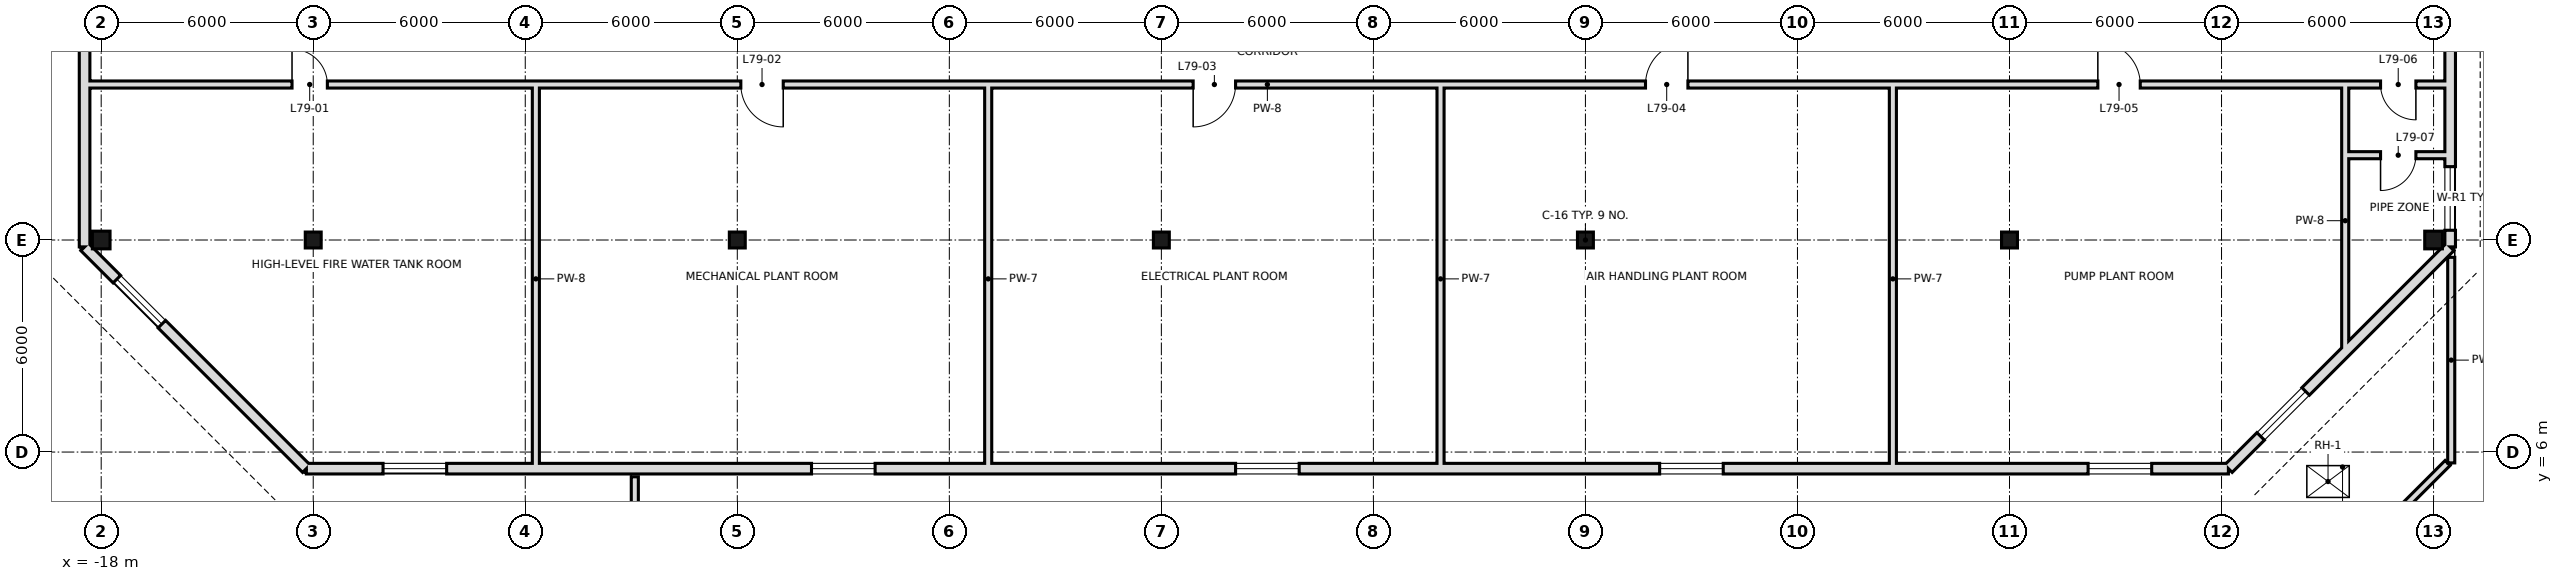
"""IFC4 building model, lengths in metres.
Left out: names, types, materials, properties, quantities, classifications, styles, units other than length and angle.
Written with IfcOpenShell. Run it as: python <this file> out.ifc"""

import sys

from ifc_helpers import new_model, si_unit, direction, frame, frame_2d, origin, origin_2d, place, context, subcontext, project, spatial, rectangle, hollow_rectangle, extrude, element, fill, save


model = new_model("IFC4")
c1 = context("Model", 3, precision=1e-05, world=origin(), true_north=direction((0.0, 1.0)))
c2 = subcontext(c1, "Body", "Model", "MODEL_VIEW")
j1 = project(units=[si_unit("LENGTHUNIT", "METRE"), si_unit("PLANEANGLEUNIT", "RADIAN")], contexts=[c1])
p1 = place(None, origin())
s1 = spatial("IfcSite", under=j1, at=p1, CompositionType="ELEMENT")
p2 = place(p1, origin())
s2 = spatial("IfcBuilding", under=s1, at=p2, CompositionType="ELEMENT")
p3 = place(p2, frame((0.0, 0.0, 331.2)))
s3 = spatial("IfcBuildingStorey", under=s2, at=p3, CompositionType="ELEMENT", Elevation=331.2)
p4 = place(p3, frame((-18.0, 12.0, 0.0), z_axis=(0.0, 0.0, 1.0), x_axis=(1.0, 0.0, 0.0)))
e1 = element("IfcColumn", 1, at=p4, inside=s3, PredefinedType="COLUMN", context=c2, shape_type="SweptSolid", body=[
    extrude(hollow_rectangle(XDim=0.5, YDim=0.5, WallThickness=0.025, at=origin_2d()), origin(), (0.0, 0.0, 1.0), 6.6),
])
for number, where, z_axis, x_axis in (
    (2, (-12.0, 12.0, 0.0), (0.0, 0.0, 1.0), (1.0, 0.0, 0.0)),
    (3, (0.0, 12.0, 0.0), (0.0, 0.0, 1.0), (1.0, 0.0, 0.0)),
    (4, (12.0, 12.0, 0.0), (0.0, 0.0, 1.0), (1.0, 0.0, 0.0)),
    (5, (24.0, 12.0, 0.0), (0.0, 0.0, 1.0), (1.0, 0.0, 0.0)),
    (6, (36.0, 12.0, 0.0), (0.0, 0.0, 1.0), (1.0, 0.0, 0.0)),
):
    element("IfcColumn", number, at=place(p3, frame(where, z_axis=z_axis, x_axis=x_axis)), inside=s3, PredefinedType="COLUMN", context=c2, shape_type="SweptSolid", body=[
        extrude(hollow_rectangle(XDim=0.45, YDim=0.45, WallThickness=0.022, at=origin_2d()), origin(), (0.0, 0.0, 1.0), 6.6),
    ])
p5 = place(p3, frame((48.0, 12.0, 0.0), z_axis=(0.0, 0.0, 1.0), x_axis=(1.0, 0.0, 0.0)))
e7 = element("IfcColumn", 7, at=p5, inside=s3, PredefinedType="COLUMN", context=c2, shape_type="SweptSolid", body=[
    extrude(hollow_rectangle(XDim=0.5, YDim=0.5, WallThickness=0.025, at=origin_2d()), origin(), (0.0, 0.0, 1.0), 6.6),
])
p6 = place(p3, frame((-12.195, 5.53, 0.0), z_axis=(0.0, 0.0, 1.0), x_axis=(1.0, 0.0, 0.0)))
e8 = element("IfcWall", 8, at=p6, inside=s3, PredefinedType="SOLIDWALL", context=c2, shape_type="SweptSolid", body=[
    extrude(rectangle(XDim=54.389, YDim=0.3, at=frame_2d((27.195, 0.0))), origin(), (0.0, 0.0, 1.0), 6.35),
])
p7 = place(p6, frame((2.17, 0.0, 0.9)))
e9 = element("IfcOpeningElement", 9, at=p7, cuts=e8, PredefinedType="OPENING", context=c2, shape_type="SweptSolid", body=[
    extrude(rectangle(XDim=1.8, YDim=1.5, at=frame_2d((0.9, 0.75))), frame((0.0, 0.16, 0.0), z_axis=(0.0, -1.0, 0.0), x_axis=(1.0, 0.0, 0.0)), (0.0, 0.0, 1.0), 0.32),
])
p8 = place(p6, frame((14.295, 0.0, 0.9)))
e10 = element("IfcOpeningElement", 10, at=p8, cuts=e8, PredefinedType="OPENING", context=c2, shape_type="SweptSolid", body=[
    extrude(rectangle(XDim=1.8, YDim=1.5, at=frame_2d((0.9, 0.75))), frame((0.0, 0.16, 0.0), z_axis=(0.0, -1.0, 0.0), x_axis=(1.0, 0.0, 0.0)), (0.0, 0.0, 1.0), 0.32),
])
p9 = place(p6, frame((26.295, 0.0, 0.9)))
e11 = element("IfcOpeningElement", 11, at=p9, cuts=e8, PredefinedType="OPENING", context=c2, shape_type="SweptSolid", body=[
    extrude(rectangle(XDim=1.8, YDim=1.5, at=frame_2d((0.9, 0.75))), frame((0.0, 0.16, 0.0), z_axis=(0.0, -1.0, 0.0), x_axis=(1.0, 0.0, 0.0)), (0.0, 0.0, 1.0), 0.32),
])
p10 = place(p6, frame((38.295, 0.0, 0.9)))
e12 = element("IfcOpeningElement", 12, at=p10, cuts=e8, PredefinedType="OPENING", context=c2, shape_type="SweptSolid", body=[
    extrude(rectangle(XDim=1.8, YDim=1.5, at=frame_2d((0.9, 0.75))), frame((0.0, 0.16, 0.0), z_axis=(0.0, -1.0, 0.0), x_axis=(1.0, 0.0, 0.0)), (0.0, 0.0, 1.0), 0.32),
])
p11 = place(p6, frame((50.419, 0.0, 0.9)))
e13 = element("IfcOpeningElement", 13, at=p11, cuts=e8, PredefinedType="OPENING", context=c2, shape_type="SweptSolid", body=[
    extrude(rectangle(XDim=1.8, YDim=1.5, at=frame_2d((0.9, 0.75))), frame((0.0, 0.16, 0.0), z_axis=(0.0, -1.0, 0.0), x_axis=(1.0, 0.0, 0.0)), (0.0, 0.0, 1.0), 0.32),
])
p12 = place(p3, frame((42.195, 5.53, 0.0), z_axis=(0.0, 0.0, 1.0), x_axis=(0.707106781187, 0.707106781187, 0.0)))
e14 = element("IfcWall", 14, at=p12, inside=s3, PredefinedType="SOLIDWALL", context=c2, shape_type="SweptSolid", body=[
    extrude(rectangle(XDim=8.875, YDim=0.3, at=frame_2d((4.438, 0.0))), origin(), (0.0, 0.0, 1.0), 6.35),
])
p13 = place(p12, frame((1.292, 0.0, 0.9)))
e15 = element("IfcOpeningElement", 15, at=p13, cuts=e14, PredefinedType="OPENING", context=c2, shape_type="SweptSolid", body=[
    extrude(rectangle(XDim=1.8, YDim=1.5, at=frame_2d((0.9, 0.75))), frame((0.0, 0.16, 0.0), z_axis=(0.0, -1.0, 0.0), x_axis=(1.0, 0.0, 0.0)), (0.0, 0.0, 1.0), 0.32),
])
p14 = place(p3, frame((48.47, 11.805, 0.0), z_axis=(0.0, 0.0, 1.0), x_axis=(0.0, 1.0, 0.0)))
e16 = element("IfcWall", 16, at=p14, inside=s3, PredefinedType="SOLIDWALL", context=c2, shape_type="SweptSolid", body=[
    extrude(rectangle(XDim=36.665, YDim=0.3, at=frame_2d((18.332, 0.0))), origin(), (0.0, 0.0, 1.0), 6.35),
])
p15 = place(p14, frame((0.47, 0.0, 0.9)))
e17 = element("IfcOpeningElement", 17, at=p15, cuts=e16, PredefinedType="OPENING", context=c2, shape_type="SweptSolid", body=[
    extrude(rectangle(XDim=1.8, YDim=1.5, at=frame_2d((0.9, 0.75))), frame((0.0, 0.16, 0.0), z_axis=(0.0, -1.0, 0.0), x_axis=(1.0, 0.0, 0.0)), (0.0, 0.0, 1.0), 0.32),
])
p16 = place(p14, frame((14.295, 0.0, 0.9)))
e18 = element("IfcOpeningElement", 18, at=p16, cuts=e16, PredefinedType="OPENING", context=c2, shape_type="SweptSolid", body=[
    extrude(rectangle(XDim=1.8, YDim=1.5, at=frame_2d((0.9, 0.75))), frame((0.0, 0.16, 0.0), z_axis=(0.0, -1.0, 0.0), x_axis=(1.0, 0.0, 0.0)), (0.0, 0.0, 1.0), 0.32),
])
p17 = place(p14, frame((26.295, 0.0, 0.9)))
e19 = element("IfcOpeningElement", 19, at=p17, cuts=e16, PredefinedType="OPENING", context=c2, shape_type="SweptSolid", body=[
    extrude(rectangle(XDim=1.8, YDim=1.5, at=frame_2d((0.9, 0.75))), frame((0.0, 0.16, 0.0), z_axis=(0.0, -1.0, 0.0), x_axis=(1.0, 0.0, 0.0)), (0.0, 0.0, 1.0), 0.32),
])
p18 = place(p3, frame((-18.47, 48.47, 0.0), z_axis=(0.0, 0.0, 1.0), x_axis=(0.0, -1.0, 0.0)))
e20 = element("IfcWall", 20, at=p18, inside=s3, PredefinedType="SOLIDWALL", context=c2, shape_type="SweptSolid", body=[
    extrude(rectangle(XDim=36.665, YDim=0.3, at=frame_2d((18.332, 0.0))), origin(), (0.0, 0.0, 1.0), 6.35),
])
p19 = place(p18, frame((2.27, 0.0, 0.9)))
e21 = element("IfcOpeningElement", 21, at=p19, cuts=e20, PredefinedType="OPENING", context=c2, shape_type="SweptSolid", body=[
    extrude(rectangle(XDim=1.8, YDim=1.5, at=frame_2d((0.9, 0.75))), frame((0.0, 0.16, 0.0), z_axis=(0.0, -1.0, 0.0), x_axis=(1.0, 0.0, 0.0)), (0.0, 0.0, 1.0), 0.32),
])
p20 = place(p18, frame((14.57, 0.0, 0.9)))
e22 = element("IfcOpeningElement", 22, at=p20, cuts=e20, PredefinedType="OPENING", context=c2, shape_type="SweptSolid", body=[
    extrude(rectangle(XDim=1.8, YDim=1.5, at=frame_2d((0.9, 0.75))), frame((0.0, 0.16, 0.0), z_axis=(0.0, -1.0, 0.0), x_axis=(1.0, 0.0, 0.0)), (0.0, 0.0, 1.0), 0.32),
])
p21 = place(p18, frame((26.57, 0.0, 0.9)))
e23 = element("IfcOpeningElement", 23, at=p21, cuts=e20, PredefinedType="OPENING", context=c2, shape_type="SweptSolid", body=[
    extrude(rectangle(XDim=1.8, YDim=1.5, at=frame_2d((0.9, 0.75))), frame((0.0, 0.16, 0.0), z_axis=(0.0, -1.0, 0.0), x_axis=(1.0, 0.0, 0.0)), (0.0, 0.0, 1.0), 0.32),
])
p22 = place(p3, frame((-18.47, 11.805, 0.0), z_axis=(0.0, 0.0, 1.0), x_axis=(0.707106781187, -0.707106781187, 0.0)))
e24 = element("IfcWall", 24, at=p22, inside=s3, PredefinedType="SOLIDWALL", context=c2, shape_type="SweptSolid", body=[
    extrude(rectangle(XDim=8.875, YDim=0.3, at=frame_2d((4.438, 0.0))), origin(), (0.0, 0.0, 1.0), 6.35),
])
p23 = place(p22, frame((1.292, 0.0, 0.9)))
e25 = element("IfcOpeningElement", 25, at=p23, cuts=e24, PredefinedType="OPENING", context=c2, shape_type="SweptSolid", body=[
    extrude(rectangle(XDim=1.8, YDim=1.5, at=frame_2d((0.9, 0.75))), frame((0.0, 0.16, 0.0), z_axis=(0.0, -1.0, 0.0), x_axis=(1.0, 0.0, 0.0)), (0.0, 0.0, 1.0), 0.32),
])
p24 = place(p3, frame((48.5, 11.51, 0.0), z_axis=(0.0, 0.0, 1.0), x_axis=(0.0, -1.0, 0.0)))
e26 = element("IfcWall", 26, at=p24, inside=s3, PredefinedType="PARAPET", context=c2, shape_type="SweptSolid", body=[
    extrude(rectangle(XDim=5.817, YDim=0.2, at=frame_2d((2.909, 0.0))), origin(), (0.0, 0.0, 1.0), 1.1),
])
p25 = place(p3, frame((48.397, 5.69, 0.0), z_axis=(0.0, 0.0, 1.0), x_axis=(-0.707106781187, -0.707106781187, 0.0)))
e27 = element("IfcWall", 27, at=p25, inside=s3, PredefinedType="PARAPET", context=c2, shape_type="SweptSolid", body=[
    extrude(rectangle(XDim=8.61, YDim=0.2, at=frame_2d((4.305, 0.0))), origin(), (0.0, 0.0, 1.0), 1.1),
])
p26 = place(p3, frame((-2.9, -0.4, 0.0), z_axis=(0.0, 0.0, 1.0), x_axis=(0.0, 1.0, 0.0)))
e28 = element("IfcWall", 28, at=p26, inside=s3, PredefinedType="PARAPET", context=c2, shape_type="SweptSolid", body=[
    extrude(rectangle(XDim=5.7, YDim=0.2, at=frame_2d((2.85, 0.0))), origin(), (0.0, 0.0, 1.0), 1.1),
])
for number, where, z_axis, x_axis in (
    (29, (-5.7, 5.5, 0.0), (0.0, 0.0, 1.0), (0.0, 1.0, 0.0)),
    (30, (7.1, 5.5, 0.0), (0.0, 0.0, 1.0), (0.0, 1.0, 0.0)),
    (31, (19.9, 5.5, 0.0), (0.0, 0.0, 1.0), (0.0, 1.0, 0.0)),
    (32, (32.7, 5.5, 0.0), (0.0, 0.0, 1.0), (0.0, 1.0, 0.0)),
):
    element("IfcWall", number, at=place(p3, frame(where, z_axis=z_axis, x_axis=x_axis)), inside=s3, PredefinedType="SOLIDWALL", context=c2, shape_type="SweptSolid", body=[
        extrude(rectangle(XDim=10.8, YDim=0.2, at=frame_2d((5.4, 0.0))), origin(), (0.0, 0.0, 1.0), 5.65),
    ])
p27 = place(p3, frame((45.5, 8.793, 0.0), z_axis=(0.0, 0.0, 1.0), x_axis=(0.0, 1.0, 0.0)))
e33 = element("IfcWall", 33, at=p27, inside=s3, PredefinedType="SOLIDWALL", context=c2, shape_type="SweptSolid", body=[
    extrude(rectangle(XDim=7.507, YDim=0.2, at=frame_2d((3.753, 0.0))), origin(), (0.0, 0.0, 1.0), 5.65),
])
p28 = place(p3, frame((45.6, 14.4, 0.0), z_axis=(0.0, 0.0, 1.0), x_axis=(1.0, 0.0, 0.0)))
e34 = element("IfcWall", 34, at=p28, inside=s3, PredefinedType="SOLIDWALL", context=c2, shape_type="SweptSolid", body=[
    extrude(rectangle(XDim=2.9, YDim=0.2, at=frame_2d((1.45, 0.0))), origin(), (0.0, 0.0, 1.0), 6.35),
])
p29 = place(p28, frame((0.9, 0.0, 0.0)))
e35 = element("IfcOpeningElement", 35, at=p29, cuts=e34, PredefinedType="OPENING", context=c2, shape_type="SweptSolid", body=[
    extrude(rectangle(XDim=1.0, YDim=2.4, at=frame_2d((0.5, 1.2))), frame((0.0, 0.11, 0.0), z_axis=(0.0, -1.0, 0.0), x_axis=(1.0, 0.0, 0.0)), (0.0, 0.0, 1.0), 0.22),
])
p30 = place(p3, frame((-18.5, 16.4, 0.0), z_axis=(0.0, 0.0, 1.0), x_axis=(1.0, 0.0, 0.0)))
e36 = element("IfcWall", 36, at=p30, inside=s3, PredefinedType="SOLIDWALL", context=c2, shape_type="SweptSolid", body=[
    extrude(rectangle(XDim=67.0, YDim=0.2, at=frame_2d((33.5, 0.0))), origin(), (0.0, 0.0, 1.0), 5.65),
])
p31 = place(p30, frame((5.9, 0.0, 0.0)))
e37 = element("IfcOpeningElement", 37, at=p31, cuts=e36, PredefinedType="OPENING", context=c2, shape_type="SweptSolid", body=[
    extrude(rectangle(XDim=1.0, YDim=2.4, at=frame_2d((0.5, 1.2))), frame((0.0, 0.11, 0.0), z_axis=(0.0, -1.0, 0.0), x_axis=(1.0, 0.0, 0.0)), (0.0, 0.0, 1.0), 0.22),
])
p32 = place(p30, frame((18.6, 0.0, 0.0)))
e38 = element("IfcOpeningElement", 38, at=p32, cuts=e36, PredefinedType="OPENING", context=c2, shape_type="SweptSolid", body=[
    extrude(rectangle(XDim=1.2, YDim=2.4, at=frame_2d((0.6, 1.2))), frame((0.0, 0.11, 0.0), z_axis=(0.0, -1.0, 0.0), x_axis=(1.0, 0.0, 0.0)), (0.0, 0.0, 1.0), 0.22),
])
p33 = place(p30, frame((31.4, 0.0, 0.0)))
e39 = element("IfcOpeningElement", 39, at=p33, cuts=e36, PredefinedType="OPENING", context=c2, shape_type="SweptSolid", body=[
    extrude(rectangle(XDim=1.2, YDim=2.4, at=frame_2d((0.6, 1.2))), frame((0.0, 0.11, 0.0), z_axis=(0.0, -1.0, 0.0), x_axis=(1.0, 0.0, 0.0)), (0.0, 0.0, 1.0), 0.22),
])
p34 = place(p30, frame((44.2, 0.0, 0.0)))
e40 = element("IfcOpeningElement", 40, at=p34, cuts=e36, PredefinedType="OPENING", context=c2, shape_type="SweptSolid", body=[
    extrude(rectangle(XDim=1.2, YDim=2.4, at=frame_2d((0.6, 1.2))), frame((0.0, 0.11, 0.0), z_axis=(0.0, -1.0, 0.0), x_axis=(1.0, 0.0, 0.0)), (0.0, 0.0, 1.0), 0.22),
])
p35 = place(p30, frame((57.0, 0.0, 0.0)))
e41 = element("IfcOpeningElement", 41, at=p35, cuts=e36, PredefinedType="OPENING", context=c2, shape_type="SweptSolid", body=[
    extrude(rectangle(XDim=1.2, YDim=2.4, at=frame_2d((0.6, 1.2))), frame((0.0, 0.11, 0.0), z_axis=(0.0, -1.0, 0.0), x_axis=(1.0, 0.0, 0.0)), (0.0, 0.0, 1.0), 0.22),
])
p36 = place(p30, frame((65.0, 0.0, 0.0)))
e42 = element("IfcOpeningElement", 42, at=p36, cuts=e36, PredefinedType="OPENING", context=c2, shape_type="SweptSolid", body=[
    extrude(rectangle(XDim=1.0, YDim=2.4, at=frame_2d((0.5, 1.2))), frame((0.0, 0.11, 0.0), z_axis=(0.0, -1.0, 0.0), x_axis=(1.0, 0.0, 0.0)), (0.0, 0.0, 1.0), 0.22),
])
p37 = place(p7, origin())
e43 = element("IfcWindow", 43, at=p37, inside=s3, PartitioningType="SINGLE_PANEL", PredefinedType="WINDOW", context=c2, shape_type="SweptSolid", body=[
    extrude(rectangle(XDim=1.8, YDim=1.5, at=frame_2d((0.9, 0.75))), frame((0.0, 0.03, 0.0), z_axis=(0.0, -1.0, 0.0), x_axis=(1.0, 0.0, 0.0)), (0.0, 0.0, 1.0), 0.06),
])
fill(e9, e43)
p38 = place(p8, origin())
e44 = element("IfcWindow", 44, at=p38, inside=s3, PartitioningType="SINGLE_PANEL", PredefinedType="WINDOW", context=c2, shape_type="SweptSolid", body=[
    extrude(rectangle(XDim=1.8, YDim=1.5, at=frame_2d((0.9, 0.75))), frame((0.0, 0.03, 0.0), z_axis=(0.0, -1.0, 0.0), x_axis=(1.0, 0.0, 0.0)), (0.0, 0.0, 1.0), 0.06),
])
fill(e10, e44)
p39 = place(p9, origin())
e45 = element("IfcWindow", 45, at=p39, inside=s3, PartitioningType="SINGLE_PANEL", PredefinedType="WINDOW", context=c2, shape_type="SweptSolid", body=[
    extrude(rectangle(XDim=1.8, YDim=1.5, at=frame_2d((0.9, 0.75))), frame((0.0, 0.03, 0.0), z_axis=(0.0, -1.0, 0.0), x_axis=(1.0, 0.0, 0.0)), (0.0, 0.0, 1.0), 0.06),
])
fill(e11, e45)
p40 = place(p10, origin())
e46 = element("IfcWindow", 46, at=p40, inside=s3, PartitioningType="SINGLE_PANEL", PredefinedType="WINDOW", context=c2, shape_type="SweptSolid", body=[
    extrude(rectangle(XDim=1.8, YDim=1.5, at=frame_2d((0.9, 0.75))), frame((0.0, 0.03, 0.0), z_axis=(0.0, -1.0, 0.0), x_axis=(1.0, 0.0, 0.0)), (0.0, 0.0, 1.0), 0.06),
])
fill(e12, e46)
p41 = place(p11, origin())
e47 = element("IfcWindow", 47, at=p41, inside=s3, PartitioningType="SINGLE_PANEL", PredefinedType="WINDOW", context=c2, shape_type="SweptSolid", body=[
    extrude(rectangle(XDim=1.8, YDim=1.5, at=frame_2d((0.9, 0.75))), frame((0.0, 0.03, 0.0), z_axis=(0.0, -1.0, 0.0), x_axis=(1.0, 0.0, 0.0)), (0.0, 0.0, 1.0), 0.06),
])
fill(e13, e47)
p42 = place(p13, origin())
e48 = element("IfcWindow", 48, at=p42, inside=s3, PartitioningType="SINGLE_PANEL", PredefinedType="WINDOW", context=c2, shape_type="SweptSolid", body=[
    extrude(rectangle(XDim=1.8, YDim=1.5, at=frame_2d((0.9, 0.75))), frame((0.0, 0.03, 0.0), z_axis=(0.0, -1.0, 0.0), x_axis=(1.0, 0.0, 0.0)), (0.0, 0.0, 1.0), 0.06),
])
fill(e15, e48)
p43 = place(p15, origin())
e49 = element("IfcWindow", 49, at=p43, inside=s3, PartitioningType="SINGLE_PANEL", PredefinedType="WINDOW", context=c2, shape_type="SweptSolid", body=[
    extrude(rectangle(XDim=1.8, YDim=1.5, at=frame_2d((0.9, 0.75))), frame((0.0, 0.03, 0.0), z_axis=(0.0, -1.0, 0.0), x_axis=(1.0, 0.0, 0.0)), (0.0, 0.0, 1.0), 0.06),
])
fill(e17, e49)
p44 = place(p23, origin())
e50 = element("IfcWindow", 50, at=p44, inside=s3, PartitioningType="SINGLE_PANEL", PredefinedType="WINDOW", context=c2, shape_type="SweptSolid", body=[
    extrude(rectangle(XDim=1.8, YDim=1.5, at=frame_2d((0.9, 0.75))), frame((0.0, 0.03, 0.0), z_axis=(0.0, -1.0, 0.0), x_axis=(1.0, 0.0, 0.0)), (0.0, 0.0, 1.0), 0.06),
])
fill(e25, e50)
p45 = place(p3, frame((0.0, 0.0, -0.3)))
p46 = place(p45, frame((45.014, 5.166, 0.0)))
p47 = place(p46, frame((0.0, 0.0, 0.25)))
e51 = element("IfcWindow", 51, at=p47, inside=s3, PartitioningType="SINGLE_PANEL", PredefinedType="SKYLIGHT", context=c2, shape_type="SweptSolid", body=[
    extrude(rectangle(XDim=0.9, YDim=1.2, at=origin_2d()), origin(), (0.0, 0.0, 1.0), 0.05),
])
p48 = place(p31, origin())
e52 = element("IfcDoor", 52, at=p48, inside=s3, OperationType="SINGLE_SWING_LEFT", PredefinedType="DOOR", context=c2, shape_type="SweptSolid", body=[
    extrude(rectangle(XDim=1.0, YDim=2.4, at=frame_2d((0.5, 1.2))), frame((0.0, 0.025, 0.0), z_axis=(0.0, -1.0, 0.0), x_axis=(1.0, 0.0, 0.0)), (0.0, 0.0, 1.0), 0.05),
])
fill(e37, e52)
p49 = place(p32, origin())
e53 = element("IfcDoor", 53, at=p49, inside=s3, OperationType="SINGLE_SWING_RIGHT", PredefinedType="DOOR", context=c2, shape_type="SweptSolid", body=[
    extrude(rectangle(XDim=1.2, YDim=2.4, at=frame_2d((0.6, 1.2))), frame((0.0, 0.025, 0.0), z_axis=(0.0, -1.0, 0.0), x_axis=(1.0, 0.0, 0.0)), (0.0, 0.0, 1.0), 0.05),
])
fill(e38, e53)
p50 = place(p33, frame((1.2, 0.0, 0.0), z_axis=(0.0, 0.0, 1.0), x_axis=(-1.0, 0.0, 0.0)))
e54 = element("IfcDoor", 54, at=p50, inside=s3, OperationType="SINGLE_SWING_RIGHT", PredefinedType="DOOR", context=c2, shape_type="SweptSolid", body=[
    extrude(rectangle(XDim=1.2, YDim=2.4, at=frame_2d((0.6, 1.2))), frame((0.0, 0.025, 0.0), z_axis=(0.0, -1.0, 0.0), x_axis=(1.0, 0.0, 0.0)), (0.0, 0.0, 1.0), 0.05),
])
fill(e39, e54)
p51 = place(p34, frame((1.2, 0.0, 0.0), z_axis=(0.0, 0.0, 1.0), x_axis=(-1.0, 0.0, 0.0)))
e55 = element("IfcDoor", 55, at=p51, inside=s3, OperationType="SINGLE_SWING_LEFT", PredefinedType="DOOR", context=c2, shape_type="SweptSolid", body=[
    extrude(rectangle(XDim=1.2, YDim=2.4, at=frame_2d((0.6, 1.2))), frame((0.0, 0.025, 0.0), z_axis=(0.0, -1.0, 0.0), x_axis=(1.0, 0.0, 0.0)), (0.0, 0.0, 1.0), 0.05),
])
fill(e40, e55)
p52 = place(p35, origin())
e56 = element("IfcDoor", 56, at=p52, inside=s3, OperationType="SINGLE_SWING_LEFT", PredefinedType="DOOR", context=c2, shape_type="SweptSolid", body=[
    extrude(rectangle(XDim=1.2, YDim=2.4, at=frame_2d((0.6, 1.2))), frame((0.0, 0.025, 0.0), z_axis=(0.0, -1.0, 0.0), x_axis=(1.0, 0.0, 0.0)), (0.0, 0.0, 1.0), 0.05),
])
fill(e41, e56)
p53 = place(p36, origin())
e57 = element("IfcDoor", 57, at=p53, inside=s3, OperationType="SINGLE_SWING_RIGHT", PredefinedType="DOOR", context=c2, shape_type="SweptSolid", body=[
    extrude(rectangle(XDim=1.0, YDim=2.4, at=frame_2d((0.5, 1.2))), frame((0.0, 0.025, 0.0), z_axis=(0.0, -1.0, 0.0), x_axis=(1.0, 0.0, 0.0)), (0.0, 0.0, 1.0), 0.05),
])
fill(e42, e57)
p54 = place(p29, frame((1.0, 0.0, 0.0), z_axis=(0.0, 0.0, 1.0), x_axis=(-1.0, 0.0, 0.0)))
e58 = element("IfcDoor", 58, at=p54, inside=s3, OperationType="SINGLE_SWING_RIGHT", PredefinedType="DOOR", context=c2, shape_type="SweptSolid", body=[
    extrude(rectangle(XDim=1.0, YDim=2.4, at=frame_2d((0.5, 1.2))), frame((0.0, 0.025, 0.0), z_axis=(0.0, -1.0, 0.0), x_axis=(1.0, 0.0, 0.0)), (0.0, 0.0, 1.0), 0.05),
])
fill(e35, e58)
save(model, sys.argv[1])
